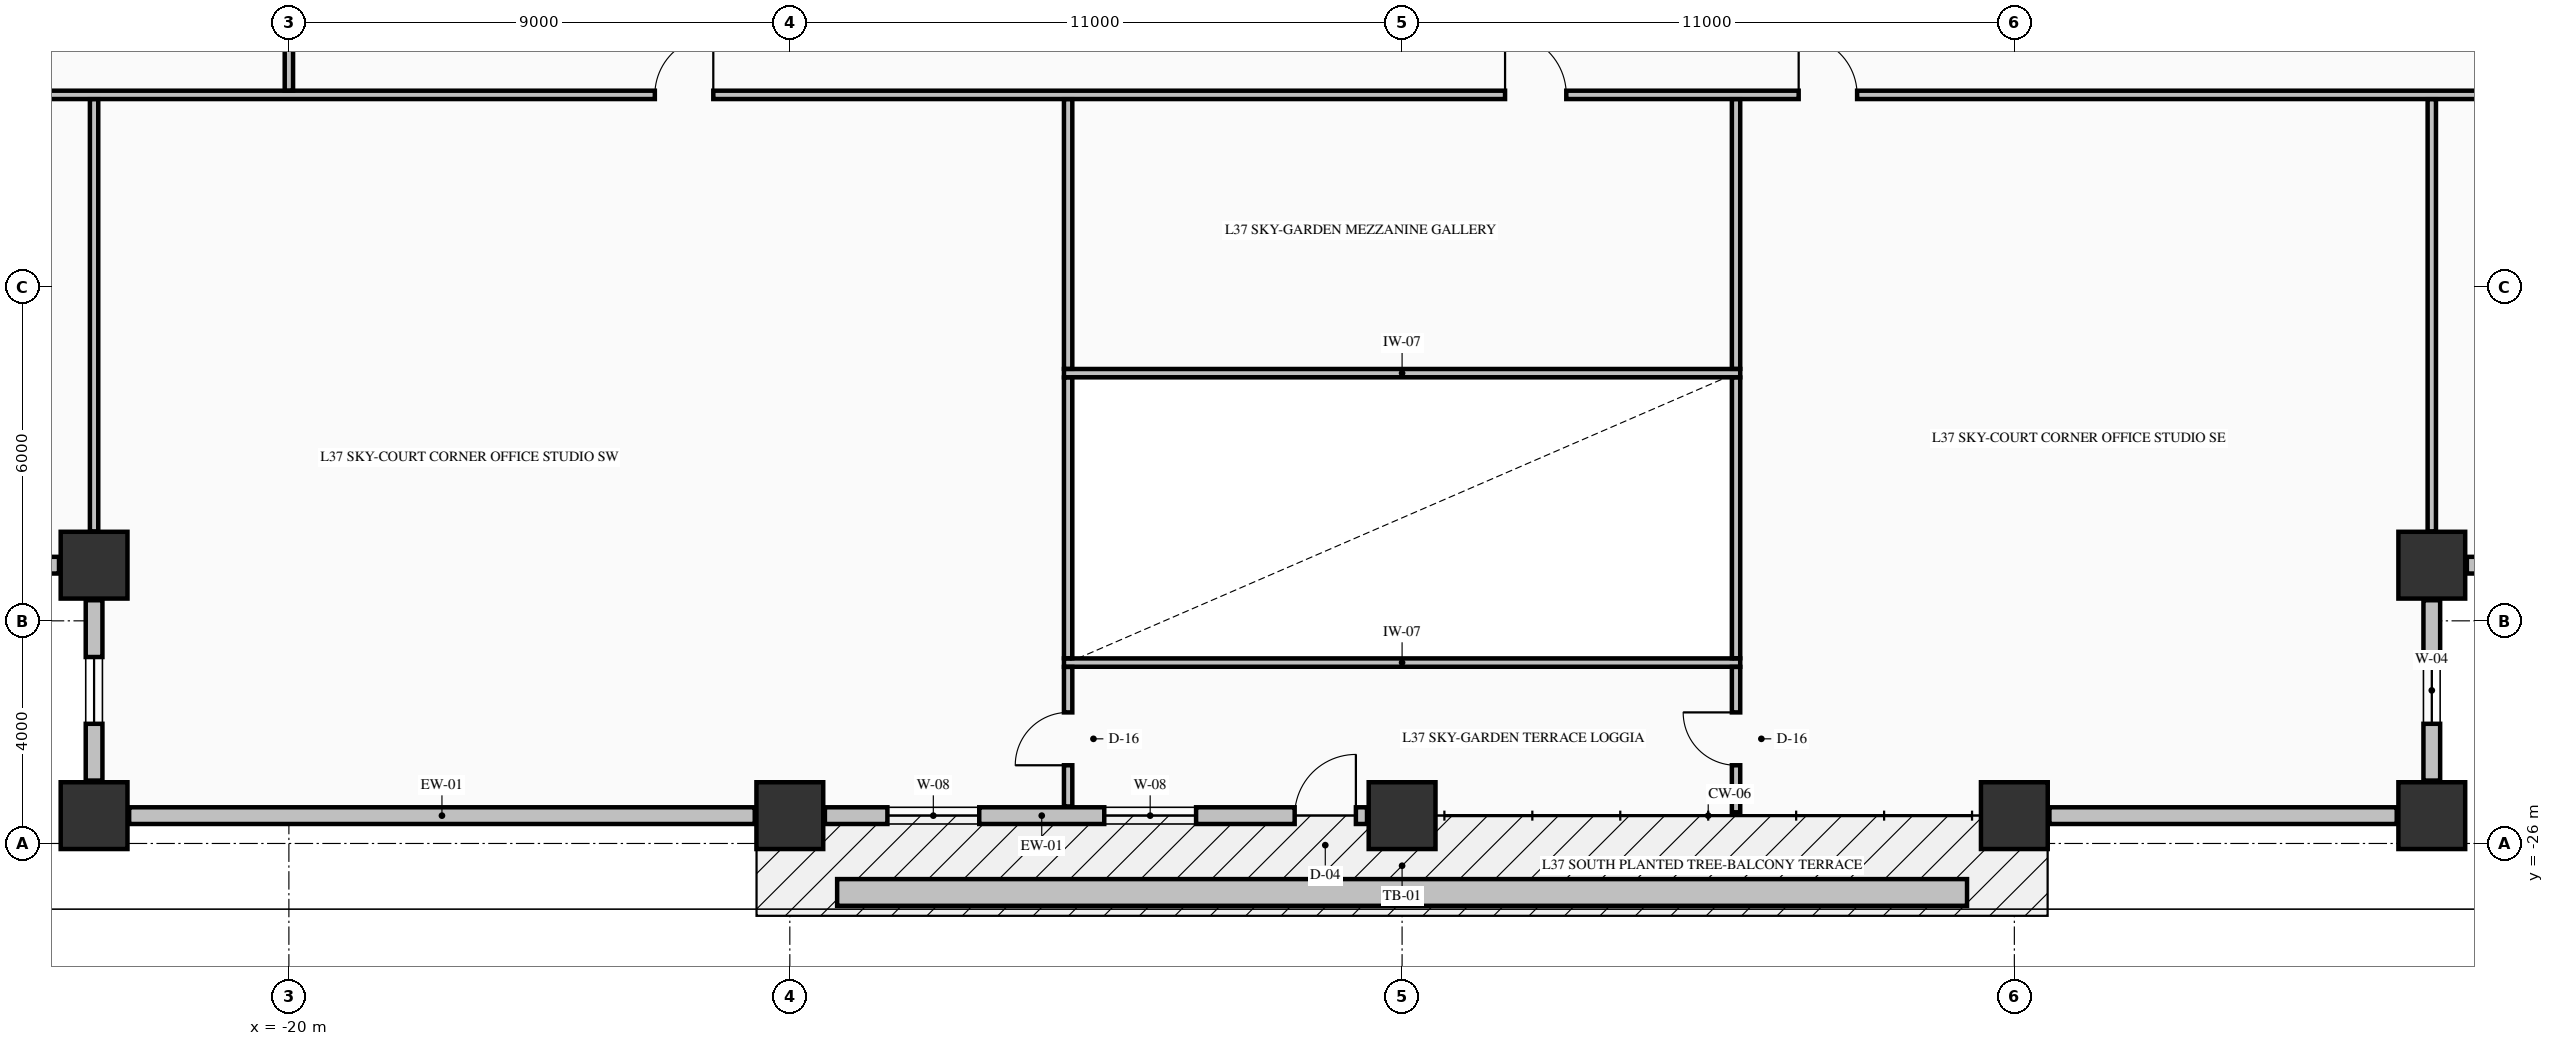
"""IFC4 building model, lengths in metres.
Left out: names, types, materials, properties, quantities, classifications, styles, units other than length and angle.
Written with IfcOpenShell. Run it as: python <this file> out.ifc"""

import sys

from ifc_helpers import new_model, si_unit, direction, frame, frame_2d, origin, origin_2d, place, context, subcontext, project, spatial, rectangle, extrude, element, fill, save


model = new_model("IFC4")
c1 = context("Model", 3, precision=1e-05, world=origin(), true_north=direction((0.0, 1.0)))
c2 = subcontext(c1, "Body", "Model", "MODEL_VIEW")
j1 = project(units=[si_unit("LENGTHUNIT", "METRE"), si_unit("PLANEANGLEUNIT", "RADIAN")], contexts=[c1])
p1 = place(None, origin())
s1 = spatial("IfcSite", under=j1, at=p1, CompositionType="ELEMENT")
p2 = place(p1, origin())
s2 = spatial("IfcBuilding", under=s1, at=p2, CompositionType="ELEMENT")
p3 = place(p2, frame((0.0, 0.0, 146.34)))
s3 = spatial("IfcBuildingStorey", under=s2, at=p3, CompositionType="ELEMENT", Elevation=146.34)
for number, where, z_axis, x_axis in (
    (1, (-23.5, -25.5, -0.25), (0.0, 0.0, 1.0), (1.0, 0.0, 0.0)),
    (2, (-11.0, -25.5, -0.25), (0.0, 0.0, 1.0), (1.0, 0.0, 0.0)),
    (3, (0.0, -25.5, -0.25), (0.0, 0.0, 1.0), (1.0, 0.0, 0.0)),
    (4, (11.0, -25.5, -0.25), (0.0, 0.0, 1.0), (1.0, 0.0, 0.0)),
    (5, (18.5, -25.5, -0.25), (0.0, 0.0, 1.0), (1.0, 0.0, 0.0)),
    (6, (-23.5, -21.0, -0.25), (0.0, 0.0, 1.0), (1.0, 0.0, 0.0)),
    (7, (18.5, -21.0, -0.25), (0.0, 0.0, 1.0), (1.0, 0.0, 0.0)),
):
    element("IfcColumn", number, at=place(p3, frame(where, z_axis=z_axis, x_axis=x_axis)), inside=s3, PredefinedType="COLUMN", context=c2, shape_type="SweptSolid", body=[
        extrude(rectangle(XDim=1.2, YDim=1.2, at=origin_2d()), origin(), (0.0, 0.0, 1.0), 3.57),
    ])
p4 = place(p3, frame((18.5, -24.87, 0.0), z_axis=(0.0, 0.0, 1.0), x_axis=(0.0, 1.0, 0.0)))
e8 = element("IfcWall", 8, at=p4, inside=s3, PredefinedType="STANDARD", context=c2, shape_type="SweptSolid", body=[
    extrude(rectangle(XDim=3.24, YDim=0.3, at=frame_2d((1.62, 0.0))), origin(), (0.0, 0.0, 1.0), 2.712),
])
p5 = place(p4, frame((1.02, 0.0, 0.82)))
e9 = element("IfcOpeningElement", 9, at=p5, cuts=e8, PredefinedType="OPENING", context=c2, shape_type="SweptSolid", body=[
    extrude(rectangle(XDim=1.2, YDim=1.65, at=frame_2d((0.6, 0.825))), frame((0.0, 0.16, 0.0), z_axis=(0.0, -1.0, 0.0), x_axis=(1.0, 0.0, 0.0)), (0.0, 0.0, 1.0), 0.32),
])
p6 = place(p3, frame((19.13, -21.0, 0.0), z_axis=(0.0, 0.0, 1.0), x_axis=(1.0, 0.0, 0.0)))
e10 = element("IfcWall", 10, at=p6, inside=s3, PredefinedType="STANDARD", context=c2, shape_type="SweptSolid", body=[
    extrude(rectangle(XDim=3.24, YDim=0.3, at=frame_2d((1.62, 0.0))), origin(), (0.0, 0.0, 1.0), 2.712),
])
p7 = place(p6, frame((1.02, 0.0, 0.82)))
e11 = element("IfcOpeningElement", 11, at=p7, cuts=e10, PredefinedType="OPENING", context=c2, shape_type="SweptSolid", body=[
    extrude(rectangle(XDim=1.2, YDim=1.65, at=frame_2d((0.6, 0.825))), frame((0.0, 0.16, 0.0), z_axis=(0.0, -1.0, 0.0), x_axis=(1.0, 0.0, 0.0)), (0.0, 0.0, 1.0), 0.32),
])
p8 = place(p3, frame((-27.37, -21.0, 0.0), z_axis=(0.0, 0.0, 1.0), x_axis=(1.0, 0.0, 0.0)))
e12 = element("IfcWall", 12, at=p8, inside=s3, PredefinedType="STANDARD", context=c2, shape_type="SweptSolid", body=[
    extrude(rectangle(XDim=3.24, YDim=0.3, at=frame_2d((1.62, 0.0))), origin(), (0.0, 0.0, 1.0), 2.712),
])
p9 = place(p8, frame((1.02, 0.0, 0.82)))
e13 = element("IfcOpeningElement", 13, at=p9, cuts=e12, PredefinedType="OPENING", context=c2, shape_type="SweptSolid", body=[
    extrude(rectangle(XDim=1.2, YDim=1.65, at=frame_2d((0.6, 0.825))), frame((0.0, 0.16, 0.0), z_axis=(0.0, -1.0, 0.0), x_axis=(1.0, 0.0, 0.0)), (0.0, 0.0, 1.0), 0.32),
])
p10 = place(p3, frame((-23.5, -21.63, 0.0), z_axis=(0.0, 0.0, 1.0), x_axis=(0.0, -1.0, 0.0)))
e14 = element("IfcWall", 14, at=p10, inside=s3, PredefinedType="STANDARD", context=c2, shape_type="SweptSolid", body=[
    extrude(rectangle(XDim=3.24, YDim=0.3, at=frame_2d((1.62, 0.0))), origin(), (0.0, 0.0, 1.0), 2.712),
])
p11 = place(p10, frame((1.02, 0.0, 0.82)))
e15 = element("IfcOpeningElement", 15, at=p11, cuts=e14, PredefinedType="OPENING", context=c2, shape_type="SweptSolid", body=[
    extrude(rectangle(XDim=1.2, YDim=1.65, at=frame_2d((0.6, 0.825))), frame((0.0, 0.16, 0.0), z_axis=(0.0, -1.0, 0.0), x_axis=(1.0, 0.0, 0.0)), (0.0, 0.0, 1.0), 0.32),
])
p12 = place(p3, frame((-22.87, -25.5, 0.0), z_axis=(0.0, 0.0, 1.0), x_axis=(1.0, 0.0, 0.0)))
e16 = element("IfcWall", 16, at=p12, inside=s3, PredefinedType="STANDARD", context=c2, shape_type="SweptSolid", body=[
    extrude(rectangle(XDim=11.24, YDim=0.3, at=frame_2d((5.62, 0.0))), origin(), (0.0, 0.0, 1.0), 2.712),
])
p13 = place(p3, frame((-10.37, -25.5, 0.0), z_axis=(0.0, 0.0, 1.0), x_axis=(1.0, 0.0, 0.0)))
e17 = element("IfcWall", 17, at=p13, inside=s3, PredefinedType="STANDARD", context=c2, shape_type="SweptSolid", body=[
    extrude(rectangle(XDim=9.74, YDim=0.3, at=frame_2d((4.87, 0.0))), origin(), (0.0, 0.0, 1.0), 2.712),
])
p14 = place(p13, frame((8.44, 0.0, 0.0)))
e18 = element("IfcOpeningElement", 18, at=p14, cuts=e17, PredefinedType="OPENING", context=c2, shape_type="SweptSolid", body=[
    extrude(rectangle(XDim=1.1, YDim=2.15, at=frame_2d((0.55, 1.075))), frame((0.0, 0.16, 0.0), z_axis=(0.0, -1.0, 0.0), x_axis=(1.0, 0.0, 0.0)), (0.0, 0.0, 1.0), 0.32),
])
p15 = place(p13, frame((1.123, 0.0, 0.8)))
e19 = element("IfcOpeningElement", 19, at=p15, cuts=e17, PredefinedType="OPENING", context=c2, shape_type="SweptSolid", body=[
    extrude(rectangle(XDim=1.65, YDim=1.7, at=frame_2d((0.825, 0.85))), frame((0.0, 0.16, 0.0), z_axis=(0.0, -1.0, 0.0), x_axis=(1.0, 0.0, 0.0)), (0.0, 0.0, 1.0), 0.32),
])
p16 = place(p13, frame((5.019, 0.0, 0.8)))
e20 = element("IfcOpeningElement", 20, at=p16, cuts=e17, PredefinedType="OPENING", context=c2, shape_type="SweptSolid", body=[
    extrude(rectangle(XDim=1.65, YDim=1.7, at=frame_2d((0.825, 0.85))), frame((0.0, 0.16, 0.0), z_axis=(0.0, -1.0, 0.0), x_axis=(1.0, 0.0, 0.0)), (0.0, 0.0, 1.0), 0.32),
])
p17 = place(p3, frame((11.63, -25.5, 0.0), z_axis=(0.0, 0.0, 1.0), x_axis=(1.0, 0.0, 0.0)))
e21 = element("IfcWall", 21, at=p17, inside=s3, PredefinedType="STANDARD", context=c2, shape_type="SweptSolid", body=[
    extrude(rectangle(XDim=6.24, YDim=0.3, at=frame_2d((3.12, 0.0))), origin(), (0.0, 0.0, 1.0), 2.712),
])
for number, where, z_axis, x_axis in (
    (22, (-6.075, -22.75, 0.0), (0.0, 0.0, 1.0), (1.0, 0.0, 0.0)),
    (23, (-6.075, -17.55, 0.0), (0.0, 0.0, 1.0), (1.0, 0.0, 0.0)),
):
    element("IfcWall", number, at=place(p3, frame(where, z_axis=z_axis, x_axis=x_axis)), inside=s3, PredefinedType="PARTITIONING", context=c2, shape_type="SweptSolid", body=[
        extrude(rectangle(XDim=12.15, YDim=0.15, at=frame_2d((6.075, 0.0))), origin(), (0.0, 0.0, 1.0), 3.32),
    ])
p18 = place(p3, frame((-27.835, -12.55, 0.0), z_axis=(0.0, 0.0, 1.0), x_axis=(1.0, 0.0, 0.0)))
e24 = element("IfcWall", 24, at=p18, inside=s3, PredefinedType="PARTITIONING", context=c2, shape_type="SweptSolid", body=[
    extrude(rectangle(XDim=50.67, YDim=0.15, at=frame_2d((25.335, 0.0))), origin(), (0.0, 0.0, 1.0), 3.32),
])
p19 = place(p18, frame((29.685, 0.0, 0.0)))
e25 = element("IfcOpeningElement", 25, at=p19, cuts=e24, PredefinedType="OPENING", context=c2, shape_type="SweptSolid", body=[
    extrude(rectangle(XDim=1.1, YDim=2.15, at=frame_2d((0.55, 1.075))), frame((0.0, 0.085, 0.0), z_axis=(0.0, -1.0, 0.0), x_axis=(1.0, 0.0, 0.0)), (0.0, 0.0, 1.0), 0.17),
])
p20 = place(p18, frame((14.41, 0.0, 0.0)))
e26 = element("IfcOpeningElement", 26, at=p20, cuts=e24, PredefinedType="OPENING", context=c2, shape_type="SweptSolid", body=[
    extrude(rectangle(XDim=1.05, YDim=2.15, at=frame_2d((0.525, 1.075))), frame((0.0, 0.085, 0.0), z_axis=(0.0, -1.0, 0.0), x_axis=(1.0, 0.0, 0.0)), (0.0, 0.0, 1.0), 0.17),
])
p21 = place(p18, frame((34.96, 0.0, 0.0)))
e27 = element("IfcOpeningElement", 27, at=p21, cuts=e24, PredefinedType="OPENING", context=c2, shape_type="SweptSolid", body=[
    extrude(rectangle(XDim=1.05, YDim=2.15, at=frame_2d((0.525, 1.075))), frame((0.0, 0.085, 0.0), z_axis=(0.0, -1.0, 0.0), x_axis=(1.0, 0.0, 0.0)), (0.0, 0.0, 1.0), 0.17),
])
p22 = place(p3, frame((-23.5, -20.394, 0.0), z_axis=(0.0, 0.0, 1.0), x_axis=(0.0, 1.0, 0.0)))
e28 = element("IfcWall", 28, at=p22, inside=s3, PredefinedType="PARTITIONING", context=c2, shape_type="SweptSolid", body=[
    extrude(rectangle(XDim=7.766, YDim=0.15, at=frame_2d((3.883, 0.0))), origin(), (0.0, 0.0, 1.0), 3.32),
])
p23 = place(p3, frame((-20.0, -12.472, 0.0), z_axis=(0.0, 0.0, 1.0), x_axis=(0.0, 1.0, 0.0)))
e29 = element("IfcWall", 29, at=p23, inside=s3, PredefinedType="PARTITIONING", context=c2, shape_type="SweptSolid", body=[
    extrude(rectangle(XDim=2.016, YDim=0.15, at=frame_2d((1.008, 0.0))), origin(), (0.0, 0.0, 1.0), 2.81),
])
p24 = place(p23, frame((0.747, 0.0, 0.0)))
e30 = element("IfcOpeningElement", 30, at=p24, cuts=e29, PredefinedType="OPENING", context=c2, shape_type="SweptSolid", body=[
    extrude(rectangle(XDim=0.95, YDim=2.15, at=frame_2d((0.475, 1.075))), frame((0.0, 0.085, 0.0), z_axis=(0.0, -1.0, 0.0), x_axis=(1.0, 0.0, 0.0)), (0.0, 0.0, 1.0), 0.17),
])
p25 = place(p3, frame((-6.0, -25.335, 0.0), z_axis=(0.0, 0.0, 1.0), x_axis=(0.0, 1.0, 0.0)))
e31 = element("IfcWall", 31, at=p25, inside=s3, PredefinedType="PARTITIONING", context=c2, shape_type="SweptSolid", body=[
    extrude(rectangle(XDim=2.507, YDim=0.15, at=frame_2d((1.253, 0.0))), origin(), (0.0, 0.0, 1.0), 3.32),
])
p26 = place(p25, frame((0.74, 0.0, 0.0)))
e32 = element("IfcOpeningElement", 32, at=p26, cuts=e31, PredefinedType="OPENING", context=c2, shape_type="SweptSolid", body=[
    extrude(rectangle(XDim=0.95, YDim=2.15, at=frame_2d((0.475, 1.075))), frame((0.0, 0.085, 0.0), z_axis=(0.0, -1.0, 0.0), x_axis=(1.0, 0.0, 0.0)), (0.0, 0.0, 1.0), 0.17),
])
p27 = place(p3, frame((-6.0, -22.672, 0.0), z_axis=(0.0, 0.0, 1.0), x_axis=(0.0, 1.0, 0.0)))
e33 = element("IfcWall", 33, at=p27, inside=s3, PredefinedType="PARTITIONING", context=c2, shape_type="SweptSolid", body=[
    extrude(rectangle(XDim=5.044, YDim=0.15, at=frame_2d((2.522, 0.0))), origin(), (0.0, 0.0, 1.0), 3.32),
])
p28 = place(p3, frame((-6.0, -17.472, 0.0), z_axis=(0.0, 0.0, 1.0), x_axis=(0.0, 1.0, 0.0)))
e34 = element("IfcWall", 34, at=p28, inside=s3, PredefinedType="PARTITIONING", context=c2, shape_type="SweptSolid", body=[
    extrude(rectangle(XDim=4.844, YDim=0.15, at=frame_2d((2.422, 0.0))), origin(), (0.0, 0.0, 1.0), 3.32),
])
p29 = place(p3, frame((6.0, -25.44, 0.0), z_axis=(0.0, 0.0, 1.0), x_axis=(0.0, 1.0, 0.0)))
e35 = element("IfcWall", 35, at=p29, inside=s3, PredefinedType="PARTITIONING", context=c2, shape_type="SweptSolid", body=[
    extrude(rectangle(XDim=2.612, YDim=0.15, at=frame_2d((1.306, 0.0))), origin(), (0.0, 0.0, 1.0), 3.32),
])
p30 = place(p29, frame((0.845, 0.0, 0.0)))
e36 = element("IfcOpeningElement", 36, at=p30, cuts=e35, PredefinedType="OPENING", context=c2, shape_type="SweptSolid", body=[
    extrude(rectangle(XDim=0.95, YDim=2.15, at=frame_2d((0.475, 1.075))), frame((0.0, 0.085, 0.0), z_axis=(0.0, -1.0, 0.0), x_axis=(1.0, 0.0, 0.0)), (0.0, 0.0, 1.0), 0.17),
])
p31 = place(p3, frame((6.0, -22.672, 0.0), z_axis=(0.0, 0.0, 1.0), x_axis=(0.0, 1.0, 0.0)))
e37 = element("IfcWall", 37, at=p31, inside=s3, PredefinedType="PARTITIONING", context=c2, shape_type="SweptSolid", body=[
    extrude(rectangle(XDim=5.044, YDim=0.15, at=frame_2d((2.522, 0.0))), origin(), (0.0, 0.0, 1.0), 3.32),
])
p32 = place(p3, frame((6.0, -17.472, 0.0), z_axis=(0.0, 0.0, 1.0), x_axis=(0.0, 1.0, 0.0)))
e38 = element("IfcWall", 38, at=p32, inside=s3, PredefinedType="PARTITIONING", context=c2, shape_type="SweptSolid", body=[
    extrude(rectangle(XDim=4.844, YDim=0.15, at=frame_2d((2.422, 0.0))), origin(), (0.0, 0.0, 1.0), 3.32),
])
p33 = place(p3, frame((18.5, -20.394, 0.0), z_axis=(0.0, 0.0, 1.0), x_axis=(0.0, 1.0, 0.0)))
e39 = element("IfcWall", 39, at=p33, inside=s3, PredefinedType="PARTITIONING", context=c2, shape_type="SweptSolid", body=[
    extrude(rectangle(XDim=7.766, YDim=0.15, at=frame_2d((3.883, 0.0))), origin(), (0.0, 0.0, 1.0), 3.32),
])
p34 = place(p3, frame((-10.15, -26.88, -0.04), z_axis=(0.0, 0.0, 1.0), x_axis=(1.0, 0.0, 0.0)))
e40 = element("IfcWall", 40, at=p34, inside=s3, PredefinedType="PARAPET", context=c2, shape_type="SweptSolid", body=[
    extrude(rectangle(XDim=20.3, YDim=0.48, at=frame_2d((10.15, 0.0))), origin(), (0.0, 0.0, 1.0), 0.52),
])
p35 = place(p5, origin())
e41 = element("IfcWindow", 41, at=p35, inside=s3, PartitioningType="SINGLE_PANEL", PredefinedType="WINDOW", context=c2, shape_type="SweptSolid", body=[
    extrude(rectangle(XDim=1.2, YDim=1.65, at=frame_2d((0.6, 0.825))), frame((0.0, 0.03, 0.0), z_axis=(0.0, -1.0, 0.0), x_axis=(1.0, 0.0, 0.0)), (0.0, 0.0, 1.0), 0.06),
])
fill(e9, e41)
p36 = place(p11, origin())
e42 = element("IfcWindow", 42, at=p36, inside=s3, PartitioningType="SINGLE_PANEL", PredefinedType="WINDOW", context=c2, shape_type="SweptSolid", body=[
    extrude(rectangle(XDim=1.2, YDim=1.65, at=frame_2d((0.6, 0.825))), frame((0.0, 0.03, 0.0), z_axis=(0.0, -1.0, 0.0), x_axis=(1.0, 0.0, 0.0)), (0.0, 0.0, 1.0), 0.06),
])
fill(e15, e42)
p37 = place(p14, origin())
e43 = element("IfcDoor", 43, at=p37, inside=s3, OperationType="SINGLE_SWING_RIGHT", PredefinedType="DOOR", context=c2, shape_type="SweptSolid", body=[
    extrude(rectangle(XDim=1.1, YDim=2.15, at=frame_2d((0.55, 1.075))), frame((0.0, 0.025, 0.0), z_axis=(0.0, -1.0, 0.0), x_axis=(1.0, 0.0, 0.0)), (0.0, 0.0, 1.0), 0.05),
])
fill(e18, e43)
p38 = place(p15, origin())
e44 = element("IfcWindow", 44, at=p38, inside=s3, PartitioningType="SINGLE_PANEL", PredefinedType="WINDOW", context=c2, shape_type="SweptSolid", body=[
    extrude(rectangle(XDim=1.65, YDim=1.7, at=frame_2d((0.825, 0.85))), frame((0.0, 0.03, 0.0), z_axis=(0.0, -1.0, 0.0), x_axis=(1.0, 0.0, 0.0)), (0.0, 0.0, 1.0), 0.06),
])
fill(e19, e44)
p39 = place(p16, origin())
e45 = element("IfcWindow", 45, at=p39, inside=s3, PartitioningType="SINGLE_PANEL", PredefinedType="WINDOW", context=c2, shape_type="SweptSolid", body=[
    extrude(rectangle(XDim=1.65, YDim=1.7, at=frame_2d((0.825, 0.85))), frame((0.0, 0.03, 0.0), z_axis=(0.0, -1.0, 0.0), x_axis=(1.0, 0.0, 0.0)), (0.0, 0.0, 1.0), 0.06),
])
fill(e20, e45)
p40 = place(p26, origin())
e46 = element("IfcDoor", 46, at=p40, inside=s3, OperationType="SINGLE_SWING_LEFT", PredefinedType="DOOR", context=c2, shape_type="SweptSolid", body=[
    extrude(rectangle(XDim=0.95, YDim=2.15, at=frame_2d((0.475, 1.075))), frame((0.0, 0.025, 0.0), z_axis=(0.0, -1.0, 0.0), x_axis=(1.0, 0.0, 0.0)), (0.0, 0.0, 1.0), 0.05),
])
fill(e32, e46)
p41 = place(p30, origin())
e47 = element("IfcDoor", 47, at=p41, inside=s3, OperationType="SINGLE_SWING_RIGHT", PredefinedType="DOOR", context=c2, shape_type="SweptSolid", body=[
    extrude(rectangle(XDim=0.95, YDim=2.15, at=frame_2d((0.475, 1.075))), frame((0.0, 0.025, 0.0), z_axis=(0.0, -1.0, 0.0), x_axis=(1.0, 0.0, 0.0)), (0.0, 0.0, 1.0), 0.05),
])
fill(e36, e47)
p42 = place(p19, origin())
e48 = element("IfcDoor", 48, at=p42, inside=s3, OperationType="SINGLE_SWING_LEFT", PredefinedType="DOOR", context=c2, shape_type="SweptSolid", body=[
    extrude(rectangle(XDim=1.1, YDim=2.15, at=frame_2d((0.55, 1.075))), frame((0.0, 0.025, 0.0), z_axis=(0.0, -1.0, 0.0), x_axis=(1.0, 0.0, 0.0)), (0.0, 0.0, 1.0), 0.05),
])
fill(e25, e48)
p43 = place(p20, origin())
e49 = element("IfcDoor", 49, at=p43, inside=s3, OperationType="SINGLE_SWING_RIGHT", PredefinedType="DOOR", context=c2, shape_type="SweptSolid", body=[
    extrude(rectangle(XDim=1.05, YDim=2.15, at=frame_2d((0.525, 1.075))), frame((0.0, 0.025, 0.0), z_axis=(0.0, -1.0, 0.0), x_axis=(1.0, 0.0, 0.0)), (0.0, 0.0, 1.0), 0.05),
])
fill(e26, e49)
p44 = place(p21, origin())
e50 = element("IfcDoor", 50, at=p44, inside=s3, OperationType="SINGLE_SWING_LEFT", PredefinedType="DOOR", context=c2, shape_type="SweptSolid", body=[
    extrude(rectangle(XDim=1.05, YDim=2.15, at=frame_2d((0.525, 1.075))), frame((0.0, 0.025, 0.0), z_axis=(0.0, -1.0, 0.0), x_axis=(1.0, 0.0, 0.0)), (0.0, 0.0, 1.0), 0.05),
])
fill(e27, e50)
save(model, sys.argv[1])
